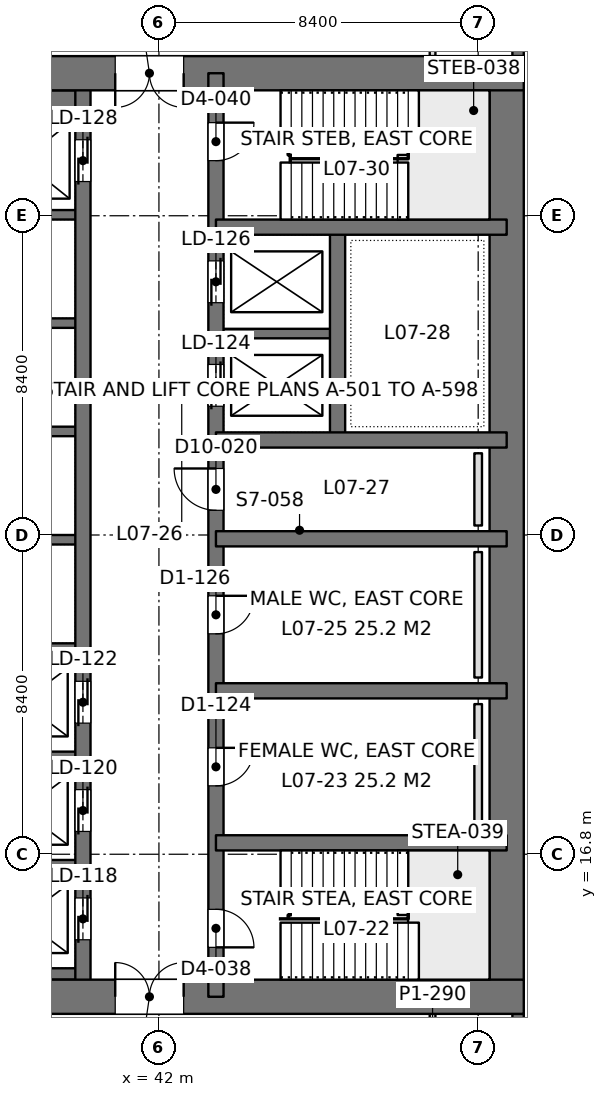
"""IFC4 building model, lengths in metres.
Left out: names, types, materials, properties, quantities, classifications, styles, units other than length and angle.
Written with IfcOpenShell. Run it as: python <this file> out.ifc"""

import sys

from ifc_helpers import new_model, si_unit, direction, frame, frame_2d, origin, place, context, subcontext, project, spatial, rectangle, extrude, element, fill, save


model = new_model("IFC4")
c1 = context("Model", 3, precision=1e-05, world=origin(), true_north=direction((0.0, 1.0)))
c2 = subcontext(c1, "Body", "Model", "MODEL_VIEW")
j1 = project(units=[si_unit("LENGTHUNIT", "METRE"), si_unit("PLANEANGLEUNIT", "RADIAN")], contexts=[c1])
p1 = place(None, origin())
s1 = spatial("IfcSite", under=j1, at=p1, CompositionType="ELEMENT")
p2 = place(p1, origin())
s2 = spatial("IfcBuilding", under=s1, at=p2, CompositionType="ELEMENT")
p3 = place(p2, frame((0.0, 0.0, 32.4)))
s3 = spatial("IfcBuildingStorey", under=s2, at=p3, CompositionType="ELEMENT", Elevation=32.4)
p4 = place(p3, frame((33.6, 13.05, 0.0), z_axis=(0.0, 0.0, 1.0), x_axis=(1.0, 0.0, 0.0)))
e1 = element("IfcWall", 1, at=p4, inside=s3, PredefinedType="SHEAR", context=c2, shape_type="SweptSolid", body=[
    extrude(rectangle(XDim=18.0, YDim=0.9, at=frame_2d((9.0, 0.0))), origin(), (0.0, 0.0, 1.0), 4.5),
])
p5 = place(p4, frame((7.25, 0.0, 0.0)))
e2 = element("IfcOpeningElement", 2, at=p5, cuts=e1, PredefinedType="OPENING", context=c2, shape_type="SweptSolid", body=[
    extrude(rectangle(XDim=1.8, YDim=2.4, at=frame_2d((0.9, 1.2))), frame((0.0, 0.46, 0.0), z_axis=(0.0, -1.0, 0.0), x_axis=(1.0, 0.0, 0.0)), (0.0, 0.0, 1.0), 0.92),
])
p6 = place(p3, frame((33.6, 37.35, 0.0), z_axis=(0.0, 0.0, 1.0), x_axis=(1.0, 0.0, 0.0)))
e3 = element("IfcWall", 3, at=p6, inside=s3, PredefinedType="SHEAR", context=c2, shape_type="SweptSolid", body=[
    extrude(rectangle(XDim=18.0, YDim=0.9, at=frame_2d((9.0, 0.0))), origin(), (0.0, 0.0, 1.0), 4.5),
])
p7 = place(p6, frame((7.25, 0.0, 0.0)))
e4 = element("IfcOpeningElement", 4, at=p7, cuts=e3, PredefinedType="OPENING", context=c2, shape_type="SweptSolid", body=[
    extrude(rectangle(XDim=1.8, YDim=2.4, at=frame_2d((0.9, 1.2))), frame((0.0, 0.46, 0.0), z_axis=(0.0, -1.0, 0.0), x_axis=(1.0, 0.0, 0.0)), (0.0, 0.0, 1.0), 0.92),
])
p8 = place(p3, frame((51.15, 13.05, 0.0), z_axis=(0.0, 0.0, 1.0), x_axis=(0.0, 1.0, 0.0)))
e5 = element("IfcWall", 5, at=p8, inside=s3, PredefinedType="SHEAR", context=c2, shape_type="SweptSolid", body=[
    extrude(rectangle(XDim=24.3, YDim=0.9, at=frame_2d((12.15, 0.0))), origin(), (0.0, 0.0, 1.0), 4.5),
])
p9 = place(p3, frame((43.5, 13.05, 0.0), z_axis=(0.0, 0.0, 1.0), x_axis=(0.0, 1.0, 0.0)))
e6 = element("IfcWall", 6, at=p9, inside=s3, PredefinedType="SHEAR", context=c2, shape_type="SweptSolid", body=[
    extrude(rectangle(XDim=24.3, YDim=0.4, at=frame_2d((12.15, 0.0))), origin(), (0.0, 0.0, 1.0), 4.5),
])
p10 = place(p9, frame((1.3, 0.0, 0.0)))
e7 = element("IfcOpeningElement", 7, at=p10, cuts=e6, PredefinedType="OPENING", context=c2, shape_type="SweptSolid", body=[
    extrude(rectangle(XDim=1.0, YDim=2.2, at=frame_2d((0.5, 1.1))), frame((0.0, 0.21, 0.0), z_axis=(0.0, -1.0, 0.0), x_axis=(1.0, 0.0, 0.0)), (0.0, 0.0, 1.0), 0.42),
])
p11 = place(p9, frame((22.0, 0.0, 0.0)))
e8 = element("IfcOpeningElement", 8, at=p11, cuts=e6, PredefinedType="OPENING", context=c2, shape_type="SweptSolid", body=[
    extrude(rectangle(XDim=1.0, YDim=2.2, at=frame_2d((0.5, 1.1))), frame((0.0, 0.21, 0.0), z_axis=(0.0, -1.0, 0.0), x_axis=(1.0, 0.0, 0.0)), (0.0, 0.0, 1.0), 0.42),
])
p12 = place(p9, frame((5.55, 0.0, 0.0)))
e9 = element("IfcOpeningElement", 9, at=p12, cuts=e6, PredefinedType="OPENING", context=c2, shape_type="SweptSolid", body=[
    extrude(rectangle(XDim=1.0, YDim=2.2, at=frame_2d((0.5, 1.1))), frame((0.0, 0.21, 0.0), z_axis=(0.0, -1.0, 0.0), x_axis=(1.0, 0.0, 0.0)), (0.0, 0.0, 1.0), 0.42),
])
p13 = place(p9, frame((9.55, 0.0, 0.0)))
e10 = element("IfcOpeningElement", 10, at=p13, cuts=e6, PredefinedType="OPENING", context=c2, shape_type="SweptSolid", body=[
    extrude(rectangle(XDim=1.0, YDim=2.2, at=frame_2d((0.5, 1.1))), frame((0.0, 0.21, 0.0), z_axis=(0.0, -1.0, 0.0), x_axis=(1.0, 0.0, 0.0)), (0.0, 0.0, 1.0), 0.42),
])
p14 = place(p9, frame((12.8, 0.0, 0.0)))
e11 = element("IfcOpeningElement", 11, at=p14, cuts=e6, PredefinedType="OPENING", context=c2, shape_type="SweptSolid", body=[
    extrude(rectangle(XDim=1.1, YDim=2.2, at=frame_2d((0.55, 1.1))), frame((0.0, 0.21, 0.0), z_axis=(0.0, -1.0, 0.0), x_axis=(1.0, 0.0, 0.0)), (0.0, 0.0, 1.0), 0.42),
])
p15 = place(p9, frame((15.538, 0.0, 0.0)))
e12 = element("IfcOpeningElement", 12, at=p15, cuts=e6, PredefinedType="OPENING", context=c2, shape_type="SweptSolid", body=[
    extrude(rectangle(XDim=1.1, YDim=2.2, at=frame_2d((0.55, 1.1))), frame((0.0, 0.21, 0.0), z_axis=(0.0, -1.0, 0.0), x_axis=(1.0, 0.0, 0.0)), (0.0, 0.0, 1.0), 0.42),
])
p16 = place(p9, frame((18.262, 0.0, 0.0)))
e13 = element("IfcOpeningElement", 13, at=p16, cuts=e6, PredefinedType="OPENING", context=c2, shape_type="SweptSolid", body=[
    extrude(rectangle(XDim=1.1, YDim=2.2, at=frame_2d((0.55, 1.1))), frame((0.0, 0.21, 0.0), z_axis=(0.0, -1.0, 0.0), x_axis=(1.0, 0.0, 0.0)), (0.0, 0.0, 1.0), 0.42),
])
p17 = place(p3, frame((40.0, 13.05, 0.0), z_axis=(0.0, 0.0, 1.0), x_axis=(0.0, 1.0, 0.0)))
e14 = element("IfcWall", 14, at=p17, inside=s3, PredefinedType="SHEAR", context=c2, shape_type="SweptSolid", body=[
    extrude(rectangle(XDim=24.3, YDim=0.4, at=frame_2d((12.15, 0.0))), origin(), (0.0, 0.0, 1.0), 4.5),
])
p18 = place(p17, frame((1.5, 0.0, 0.0)))
e15 = element("IfcOpeningElement", 15, at=p18, cuts=e14, PredefinedType="OPENING", context=c2, shape_type="SweptSolid", body=[
    extrude(rectangle(XDim=1.1, YDim=2.2, at=frame_2d((0.55, 1.1))), frame((0.0, 0.21, 0.0), z_axis=(0.0, -1.0, 0.0), x_axis=(1.0, 0.0, 0.0)), (0.0, 0.0, 1.0), 0.42),
])
p19 = place(p17, frame((4.35, 0.0, 0.0)))
e16 = element("IfcOpeningElement", 16, at=p19, cuts=e14, PredefinedType="OPENING", context=c2, shape_type="SweptSolid", body=[
    extrude(rectangle(XDim=1.1, YDim=2.2, at=frame_2d((0.55, 1.1))), frame((0.0, 0.21, 0.0), z_axis=(0.0, -1.0, 0.0), x_axis=(1.0, 0.0, 0.0)), (0.0, 0.0, 1.0), 0.42),
])
p20 = place(p17, frame((7.2, 0.0, 0.0)))
e17 = element("IfcOpeningElement", 17, at=p20, cuts=e14, PredefinedType="OPENING", context=c2, shape_type="SweptSolid", body=[
    extrude(rectangle(XDim=1.1, YDim=2.2, at=frame_2d((0.55, 1.1))), frame((0.0, 0.21, 0.0), z_axis=(0.0, -1.0, 0.0), x_axis=(1.0, 0.0, 0.0)), (0.0, 0.0, 1.0), 0.42),
])
p21 = place(p17, frame((21.45, 0.0, 0.0)))
e18 = element("IfcOpeningElement", 18, at=p21, cuts=e14, PredefinedType="OPENING", context=c2, shape_type="SweptSolid", body=[
    extrude(rectangle(XDim=1.1, YDim=2.2, at=frame_2d((0.55, 1.1))), frame((0.0, 0.21, 0.0), z_axis=(0.0, -1.0, 0.0), x_axis=(1.0, 0.0, 0.0)), (0.0, 0.0, 1.0), 0.42),
])
for number, where, z_axis, x_axis in (
    (19, (51.15, 17.1, 0.0), (0.0, 0.0, 1.0), (-1.0, 0.0, 0.0)),
    (20, (51.15, 21.1, 0.0), (0.0, 0.0, 1.0), (-1.0, 0.0, 0.0)),
    (21, (51.15, 25.1, 0.0), (0.0, 0.0, 1.0), (-1.0, 0.0, 0.0)),
    (22, (51.15, 27.7, 0.0), (0.0, 0.0, 1.0), (-1.0, 0.0, 0.0)),
    (23, (51.15, 33.3, 0.0), (0.0, 0.0, 1.0), (-1.0, 0.0, 0.0)),
):
    element("IfcWall", number, at=place(p3, frame(where, z_axis=z_axis, x_axis=x_axis)), inside=s3, PredefinedType="SHEAR", context=c2, shape_type="SweptSolid", body=[
        extrude(rectangle(XDim=7.65, YDim=0.4, at=frame_2d((3.825, 0.0))), origin(), (0.0, 0.0, 1.0), 4.5),
    ])
p22 = place(p3, frame((46.7, 27.7, 0.0), z_axis=(0.0, 0.0, 1.0), x_axis=(0.0, 1.0, 0.0)))
e24 = element("IfcWall", 24, at=p22, inside=s3, PredefinedType="SHEAR", context=c2, shape_type="SweptSolid", body=[
    extrude(rectangle(XDim=5.6, YDim=0.4, at=frame_2d((2.8, 0.0))), origin(), (0.0, 0.0, 1.0), 4.5),
])
p23 = place(p3, frame((46.7, 30.5, 0.0), z_axis=(0.0, 0.0, 1.0), x_axis=(-1.0, 0.0, 0.0)))
e25 = element("IfcWall", 25, at=p23, inside=s3, PredefinedType="SHEAR", context=c2, shape_type="SweptSolid", body=[
    extrude(rectangle(XDim=3.2, YDim=0.25, at=frame_2d((1.6, 0.0))), origin(), (0.0, 0.0, 1.0), 4.5),
])
p24 = place(p3, frame((40.0, 13.65, 0.0), z_axis=(0.0, 0.0, 1.0), x_axis=(-1.0, 0.0, 0.0)))
e26 = element("IfcWall", 26, at=p24, inside=s3, PredefinedType="SHEAR", context=c2, shape_type="SweptSolid", body=[
    extrude(rectangle(XDim=3.2, YDim=0.3, at=frame_2d((1.6, 0.0))), origin(), (0.0, 0.0, 1.0), 4.5),
])
for number, where, z_axis, x_axis in (
    (27, (40.0, 16.525, 0.0), (0.0, 0.0, 1.0), (-1.0, 0.0, 0.0)),
    (28, (40.0, 19.375, 0.0), (0.0, 0.0, 1.0), (-1.0, 0.0, 0.0)),
    (29, (40.0, 22.225, 0.0), (0.0, 0.0, 1.0), (-1.0, 0.0, 0.0)),
    (30, (40.0, 25.075, 0.0), (0.0, 0.0, 1.0), (-1.0, 0.0, 0.0)),
    (31, (40.0, 27.925, 0.0), (0.0, 0.0, 1.0), (-1.0, 0.0, 0.0)),
    (32, (40.0, 30.775, 0.0), (0.0, 0.0, 1.0), (-1.0, 0.0, 0.0)),
    (33, (40.0, 33.625, 0.0), (0.0, 0.0, 1.0), (-1.0, 0.0, 0.0)),
):
    element("IfcWall", number, at=place(p3, frame(where, z_axis=z_axis, x_axis=x_axis)), inside=s3, PredefinedType="SHEAR", context=c2, shape_type="SweptSolid", body=[
        extrude(rectangle(XDim=3.2, YDim=0.25, at=frame_2d((1.6, 0.0))), origin(), (0.0, 0.0, 1.0), 4.5),
    ])
p25 = place(p3, frame((40.0, 36.625, 0.0), z_axis=(0.0, 0.0, 1.0), x_axis=(-1.0, 0.0, 0.0)))
e34 = element("IfcWall", 34, at=p25, inside=s3, PredefinedType="SHEAR", context=c2, shape_type="SweptSolid", body=[
    extrude(rectangle(XDim=3.2, YDim=0.55, at=frame_2d((1.6, 0.0))), origin(), (0.0, 0.0, 1.0), 4.5),
])
p26 = place(p3, frame((51.45, 42.0, 0.0), z_axis=(0.0, 0.0, 1.0), x_axis=(0.0, -1.0, 0.0)))
e35 = element("IfcWall", 35, at=p26, inside=s3, PredefinedType="SOLIDWALL", context=c2, shape_type="SweptSolid", body=[
    extrude(rectangle(XDim=4.2, YDim=0.3, at=frame_2d((2.1, 0.0))), origin(), (0.0, 0.0, 1.0), 4.34),
])
p27 = place(p26, frame((0.9, 0.0, 0.9)))
e36 = element("IfcOpeningElement", 36, at=p27, cuts=e35, PredefinedType="OPENING", context=c2, shape_type="SweptSolid", body=[
    extrude(rectangle(XDim=2.4, YDim=1.9, at=frame_2d((1.2, 0.95))), frame((0.0, 0.16, 0.0), z_axis=(0.0, -1.0, 0.0), x_axis=(1.0, 0.0, 0.0)), (0.0, 0.0, 1.0), 0.32),
])
p28 = place(p3, frame((51.45, 12.6, 0.0), z_axis=(0.0, 0.0, 1.0), x_axis=(0.0, -1.0, 0.0)))
e37 = element("IfcWall", 37, at=p28, inside=s3, PredefinedType="SOLIDWALL", context=c2, shape_type="SweptSolid", body=[
    extrude(rectangle(XDim=4.2, YDim=0.3, at=frame_2d((2.1, 0.0))), origin(), (0.0, 0.0, 1.0), 4.34),
])
p29 = place(p28, frame((0.9, 0.0, 0.9)))
e38 = element("IfcOpeningElement", 38, at=p29, cuts=e37, PredefinedType="OPENING", context=c2, shape_type="SweptSolid", body=[
    extrude(rectangle(XDim=2.4, YDim=1.9, at=frame_2d((1.2, 0.95))), frame((0.0, 0.16, 0.0), z_axis=(0.0, -1.0, 0.0), x_axis=(1.0, 0.0, 0.0)), (0.0, 0.0, 1.0), 0.32),
])
p30 = place(p3, frame((49.2, 10.4, 0.0), z_axis=(0.0, 0.0, 1.0), x_axis=(0.0, 1.0, 0.0)))
e39 = element("IfcWall", 39, at=p30, inside=s3, PredefinedType="PARTITIONING", context=c2, shape_type="SweptSolid", body=[
    extrude(rectangle(XDim=2.202, YDim=0.15, at=frame_2d((1.101, 0.0))), origin(), (0.0, 0.0, 1.0), 4.34),
])
p31 = place(p3, frame((49.2, 37.8, 0.0), z_axis=(0.0, 0.0, 1.0), x_axis=(0.0, 1.0, 0.0)))
e40 = element("IfcWall", 40, at=p31, inside=s3, PredefinedType="PARTITIONING", context=c2, shape_type="SweptSolid", body=[
    extrude(rectangle(XDim=2.2, YDim=0.15, at=frame_2d((1.1, 0.0))), origin(), (0.0, 0.0, 1.0), 4.34),
])
for number, where, z_axis, x_axis in (
    (41, (50.4, 17.45, 0.0), (0.0, 0.0, 1.0), (0.0, 1.0, 0.0)),
    (42, (50.4, 21.45, 0.0), (0.0, 0.0, 1.0), (0.0, 1.0, 0.0)),
):
    element("IfcWall", number, at=place(p3, frame(where, z_axis=z_axis, x_axis=x_axis)), inside=s3, PredefinedType="PLUMBINGWALL", context=c2, shape_type="SweptSolid", body=[
        extrude(rectangle(XDim=3.3, YDim=0.2, at=frame_2d((1.65, 0.0))), origin(), (0.0, 0.0, 1.0), 1.2),
    ])
p32 = place(p3, frame((50.4, 25.45, 0.0), z_axis=(0.0, 0.0, 1.0), x_axis=(0.0, 1.0, 0.0)))
e43 = element("IfcWall", 43, at=p32, inside=s3, PredefinedType="PLUMBINGWALL", context=c2, shape_type="SweptSolid", body=[
    extrude(rectangle(XDim=1.9, YDim=0.2, at=frame_2d((0.95, 0.0))), origin(), (0.0, 0.0, 1.0), 1.2),
])
p33 = place(p5, origin())
e44 = element("IfcDoor", 44, at=p33, inside=s3, OperationType="DOUBLE_DOOR_SINGLE_SWING", PredefinedType="DOOR", context=c2, shape_type="SweptSolid", body=[
    extrude(rectangle(XDim=1.8, YDim=2.4, at=frame_2d((0.9, 1.2))), frame((0.0, 0.025, 0.0), z_axis=(0.0, -1.0, 0.0), x_axis=(1.0, 0.0, 0.0)), (0.0, 0.0, 1.0), 0.05),
])
fill(e2, e44)
p34 = place(p7, frame((1.8, 0.0, 0.0), z_axis=(0.0, 0.0, 1.0), x_axis=(-1.0, 0.0, 0.0)))
e45 = element("IfcDoor", 45, at=p34, inside=s3, OperationType="DOUBLE_DOOR_SINGLE_SWING", PredefinedType="DOOR", context=c2, shape_type="SweptSolid", body=[
    extrude(rectangle(XDim=1.8, YDim=2.4, at=frame_2d((0.9, 1.2))), frame((0.0, 0.025, 0.0), z_axis=(0.0, -1.0, 0.0), x_axis=(1.0, 0.0, 0.0)), (0.0, 0.0, 1.0), 0.05),
])
fill(e4, e45)
p35 = place(p10, frame((1.0, 0.0, 0.0), z_axis=(0.0, 0.0, 1.0), x_axis=(-1.0, 0.0, 0.0)))
e46 = element("IfcDoor", 46, at=p35, inside=s3, OperationType="SINGLE_SWING_RIGHT", PredefinedType="DOOR", context=c2, shape_type="SweptSolid", body=[
    extrude(rectangle(XDim=1.0, YDim=2.2, at=frame_2d((0.5, 1.1))), frame((0.0, 0.025, 0.0), z_axis=(0.0, -1.0, 0.0), x_axis=(1.0, 0.0, 0.0)), (0.0, 0.0, 1.0), 0.05),
])
fill(e7, e46)
p36 = place(p11, frame((1.0, 0.0, 0.0), z_axis=(0.0, 0.0, 1.0), x_axis=(-1.0, 0.0, 0.0)))
e47 = element("IfcDoor", 47, at=p36, inside=s3, OperationType="SINGLE_SWING_LEFT", PredefinedType="DOOR", context=c2, shape_type="SweptSolid", body=[
    extrude(rectangle(XDim=1.0, YDim=2.2, at=frame_2d((0.5, 1.1))), frame((0.0, 0.025, 0.0), z_axis=(0.0, -1.0, 0.0), x_axis=(1.0, 0.0, 0.0)), (0.0, 0.0, 1.0), 0.05),
])
fill(e8, e47)
p37 = place(p12, frame((1.0, 0.0, 0.0), z_axis=(0.0, 0.0, 1.0), x_axis=(-1.0, 0.0, 0.0)))
e48 = element("IfcDoor", 48, at=p37, inside=s3, OperationType="SINGLE_SWING_LEFT", PredefinedType="DOOR", context=c2, shape_type="SweptSolid", body=[
    extrude(rectangle(XDim=1.0, YDim=2.2, at=frame_2d((0.5, 1.1))), frame((0.0, 0.025, 0.0), z_axis=(0.0, -1.0, 0.0), x_axis=(1.0, 0.0, 0.0)), (0.0, 0.0, 1.0), 0.05),
])
fill(e9, e48)
p38 = place(p13, frame((1.0, 0.0, 0.0), z_axis=(0.0, 0.0, 1.0), x_axis=(-1.0, 0.0, 0.0)))
e49 = element("IfcDoor", 49, at=p38, inside=s3, OperationType="SINGLE_SWING_LEFT", PredefinedType="DOOR", context=c2, shape_type="SweptSolid", body=[
    extrude(rectangle(XDim=1.0, YDim=2.2, at=frame_2d((0.5, 1.1))), frame((0.0, 0.025, 0.0), z_axis=(0.0, -1.0, 0.0), x_axis=(1.0, 0.0, 0.0)), (0.0, 0.0, 1.0), 0.05),
])
fill(e10, e49)
p39 = place(p14, origin())
e50 = element("IfcDoor", 50, at=p39, inside=s3, OperationType="SINGLE_SWING_RIGHT", PredefinedType="DOOR", context=c2, shape_type="SweptSolid", body=[
    extrude(rectangle(XDim=1.1, YDim=2.2, at=frame_2d((0.55, 1.1))), frame((0.0, 0.025, 0.0), z_axis=(0.0, -1.0, 0.0), x_axis=(1.0, 0.0, 0.0)), (0.0, 0.0, 1.0), 0.05),
])
fill(e11, e50)
p40 = place(p18, origin())
e51 = element("IfcDoor", 51, at=p40, inside=s3, OperationType="DOUBLE_DOOR_SLIDING", PredefinedType="DOOR", context=c2, shape_type="SweptSolid", body=[
    extrude(rectangle(XDim=1.1, YDim=2.2, at=frame_2d((0.55, 1.1))), frame((0.0, 0.025, 0.0), z_axis=(0.0, -1.0, 0.0), x_axis=(1.0, 0.0, 0.0)), (0.0, 0.0, 1.0), 0.05),
])
fill(e15, e51)
p41 = place(p19, origin())
e52 = element("IfcDoor", 52, at=p41, inside=s3, OperationType="DOUBLE_DOOR_SLIDING", PredefinedType="DOOR", context=c2, shape_type="SweptSolid", body=[
    extrude(rectangle(XDim=1.1, YDim=2.2, at=frame_2d((0.55, 1.1))), frame((0.0, 0.025, 0.0), z_axis=(0.0, -1.0, 0.0), x_axis=(1.0, 0.0, 0.0)), (0.0, 0.0, 1.0), 0.05),
])
fill(e16, e52)
p42 = place(p20, origin())
e53 = element("IfcDoor", 53, at=p42, inside=s3, OperationType="DOUBLE_DOOR_SLIDING", PredefinedType="DOOR", context=c2, shape_type="SweptSolid", body=[
    extrude(rectangle(XDim=1.1, YDim=2.2, at=frame_2d((0.55, 1.1))), frame((0.0, 0.025, 0.0), z_axis=(0.0, -1.0, 0.0), x_axis=(1.0, 0.0, 0.0)), (0.0, 0.0, 1.0), 0.05),
])
fill(e17, e53)
p43 = place(p21, origin())
e54 = element("IfcDoor", 54, at=p43, inside=s3, OperationType="DOUBLE_DOOR_SLIDING", PredefinedType="DOOR", context=c2, shape_type="SweptSolid", body=[
    extrude(rectangle(XDim=1.1, YDim=2.2, at=frame_2d((0.55, 1.1))), frame((0.0, 0.025, 0.0), z_axis=(0.0, -1.0, 0.0), x_axis=(1.0, 0.0, 0.0)), (0.0, 0.0, 1.0), 0.05),
])
fill(e18, e54)
p44 = place(p15, origin())
e55 = element("IfcDoor", 55, at=p44, inside=s3, OperationType="DOUBLE_DOOR_SLIDING", PredefinedType="DOOR", context=c2, shape_type="SweptSolid", body=[
    extrude(rectangle(XDim=1.1, YDim=2.2, at=frame_2d((0.55, 1.1))), frame((0.0, 0.025, 0.0), z_axis=(0.0, -1.0, 0.0), x_axis=(1.0, 0.0, 0.0)), (0.0, 0.0, 1.0), 0.05),
])
fill(e12, e55)
p45 = place(p16, origin())
e56 = element("IfcDoor", 56, at=p45, inside=s3, OperationType="DOUBLE_DOOR_SLIDING", PredefinedType="DOOR", context=c2, shape_type="SweptSolid", body=[
    extrude(rectangle(XDim=1.1, YDim=2.2, at=frame_2d((0.55, 1.1))), frame((0.0, 0.025, 0.0), z_axis=(0.0, -1.0, 0.0), x_axis=(1.0, 0.0, 0.0)), (0.0, 0.0, 1.0), 0.05),
])
fill(e13, e56)
save(model, sys.argv[1])
